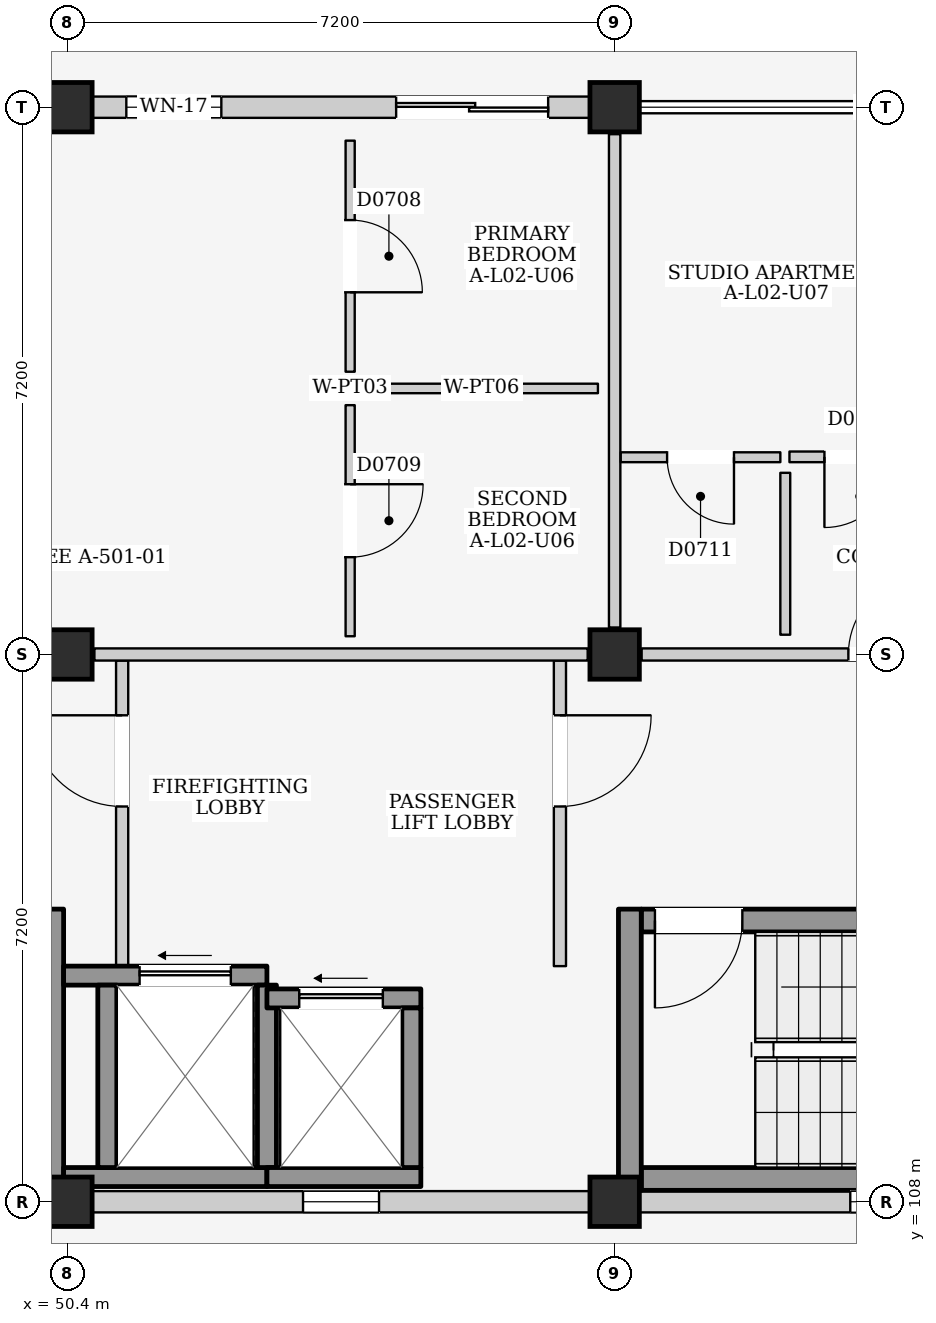
"""IFC4 building model, lengths in metres.
Left out: names, types, materials, properties, quantities, classifications, styles, units other than length and angle.
Written with IfcOpenShell. Run it as: python <this file> out.ifc"""

import sys

from ifc_helpers import new_model, si_unit, direction, frame, frame_2d, origin, origin_2d, place, context, subcontext, project, spatial, rectangle, extrude, element, fill, save


model = new_model("IFC4")
c1 = context("Model", 3, precision=1e-05, world=origin(), true_north=direction((0.0, 1.0)))
c2 = subcontext(c1, "Body", "Model", "MODEL_VIEW")
j1 = project(units=[si_unit("LENGTHUNIT", "METRE"), si_unit("PLANEANGLEUNIT", "RADIAN")], contexts=[c1])
p1 = place(None, origin())
s1 = spatial("IfcSite", under=j1, at=p1, CompositionType="ELEMENT")
p2 = place(p1, origin())
s2 = spatial("IfcBuilding", under=s1, at=p2, CompositionType="ELEMENT")
p3 = place(p2, frame((0.0, 0.0, 9.0)))
s3 = spatial("IfcBuildingStorey", under=s2, at=p3, CompositionType="ELEMENT", Elevation=9.0)
for number, where, z_axis, x_axis in (
    (1, (50.4, 108.0, 0.0), (0.0, 0.0, 1.0), (1.0, 0.0, 0.0)),
    (2, (50.4, 115.2, 0.0), (0.0, 0.0, 1.0), (1.0, 0.0, 0.0)),
    (3, (50.4, 122.4, 0.0), (0.0, 0.0, 1.0), (1.0, 0.0, 0.0)),
    (4, (57.6, 108.0, 0.0), (0.0, 0.0, 1.0), (1.0, 0.0, 0.0)),
    (5, (57.6, 115.2, 0.0), (0.0, 0.0, 1.0), (1.0, 0.0, 0.0)),
    (6, (57.6, 122.4, 0.0), (0.0, 0.0, 1.0), (1.0, 0.0, 0.0)),
):
    element("IfcColumn", number, at=place(p3, frame(where, z_axis=z_axis, x_axis=x_axis)), inside=s3, PredefinedType="COLUMN", context=c2, shape_type="SweptSolid", body=[
        extrude(rectangle(XDim=0.65, YDim=0.65, at=origin_2d()), origin(), (0.0, 0.0, 1.0), 3.2),
    ])
p4 = place(p3, frame((50.725, 122.4, 0.0), z_axis=(0.0, 0.0, 1.0), x_axis=(1.0, 0.0, 0.0)))
e7 = element("IfcWall", 7, at=p4, inside=s3, PredefinedType="ELEMENTEDWALL", context=c2, shape_type="SweptSolid", body=[
    extrude(rectangle(XDim=6.55, YDim=0.28, at=frame_2d((3.275, 0.0))), origin(), (0.0, 0.0, 1.0), 2.425),
])
p5 = place(p4, frame((4.0, 0.0, 0.0)))
e8 = element("IfcOpeningElement", 8, at=p5, cuts=e7, PredefinedType="OPENING", context=c2, shape_type="SweptSolid", body=[
    extrude(rectangle(XDim=2.0, YDim=2.12, at=frame_2d((1.0, 1.06))), frame((0.0, 0.155, 0.0), z_axis=(0.0, -1.0, 0.0), x_axis=(1.0, 0.0, 0.0)), (0.0, 0.0, 1.0), 0.31),
])
p6 = place(p4, frame((0.45, 0.0, 0.9)))
e9 = element("IfcOpeningElement", 9, at=p6, cuts=e7, PredefinedType="OPENING", context=c2, shape_type="SweptSolid", body=[
    extrude(rectangle(XDim=1.25, YDim=1.3, at=frame_2d((0.625, 0.65))), frame((0.0, 0.155, 0.0), z_axis=(0.0, -1.0, 0.0), x_axis=(1.0, 0.0, 0.0)), (0.0, 0.0, 1.0), 0.31),
])
p7 = place(p3, frame((50.725, 108.0, 0.0), z_axis=(0.0, 0.0, 1.0), x_axis=(1.0, 0.0, 0.0)))
e10 = element("IfcWall", 10, at=p7, inside=s3, PredefinedType="ELEMENTEDWALL", context=c2, shape_type="SweptSolid", body=[
    extrude(rectangle(XDim=6.55, YDim=0.28, at=frame_2d((3.275, 0.0))), origin(), (0.0, 0.0, 1.0), 2.295),
])
p8 = place(p7, frame((2.775, 0.0, 1.2)))
e11 = element("IfcOpeningElement", 11, at=p8, cuts=e10, PredefinedType="OPENING", context=c2, shape_type="SweptSolid", body=[
    extrude(rectangle(XDim=1.0, YDim=0.9, at=frame_2d((0.5, 0.45))), frame((0.0, 0.155, 0.0), z_axis=(0.0, -1.0, 0.0), x_axis=(1.0, 0.0, 0.0)), (0.0, 0.0, 1.0), 0.31),
])
p9 = place(p3, frame((57.925, 108.0, 0.0), z_axis=(0.0, 0.0, 1.0), x_axis=(1.0, 0.0, 0.0)))
e12 = element("IfcWall", 12, at=p9, inside=s3, PredefinedType="ELEMENTEDWALL", context=c2, shape_type="SweptSolid", body=[
    extrude(rectangle(XDim=6.55, YDim=0.28, at=frame_2d((3.275, 0.0))), origin(), (0.0, 0.0, 1.0), 2.295),
])
p10 = place(p9, frame((2.775, 0.0, 1.2)))
e13 = element("IfcOpeningElement", 13, at=p10, cuts=e12, PredefinedType="OPENING", context=c2, shape_type="SweptSolid", body=[
    extrude(rectangle(XDim=1.0, YDim=0.9, at=frame_2d((0.5, 0.45))), frame((0.0, 0.155, 0.0), z_axis=(0.0, -1.0, 0.0), x_axis=(1.0, 0.0, 0.0)), (0.0, 0.0, 1.0), 0.31),
])
p11 = place(p3, frame((50.2, 108.15, 0.0), z_axis=(0.0, 0.0, 1.0), x_axis=(0.0, 1.0, 0.0)))
e14 = element("IfcWall", 14, at=p11, inside=s3, PredefinedType="SHEAR", context=c2, shape_type="SweptSolid", body=[
    extrude(rectangle(XDim=3.7, YDim=0.3, at=frame_2d((1.85, 0.0))), origin(), (0.0, 0.0, 1.0), 2.96),
])
p12 = place(p3, frame((51.12, 111.1, 0.0), z_axis=(0.0, 0.0, 1.0), x_axis=(0.0, 1.0, 0.0)))
e15 = element("IfcWall", 15, at=p12, inside=s3, PredefinedType="PARTITIONING", context=c2, shape_type="SweptSolid", body=[
    extrude(rectangle(XDim=4.02, YDim=0.16, at=frame_2d((2.01, 0.0))), origin(), (0.0, 0.0, 1.0), 2.96),
])
p13 = place(p12, frame((2.1, 0.0, 0.0)))
e16 = element("IfcOpeningElement", 16, at=p13, cuts=e15, PredefinedType="OPENING", context=c2, shape_type="SweptSolid", body=[
    extrude(rectangle(XDim=1.2, YDim=2.2, at=frame_2d((0.6, 1.1))), frame((0.0, 0.095, 0.0), z_axis=(0.0, -1.0, 0.0), x_axis=(1.0, 0.0, 0.0)), (0.0, 0.0, 1.0), 0.19),
])
p14 = place(p3, frame((56.88, 111.1, 0.0), z_axis=(0.0, 0.0, 1.0), x_axis=(0.0, 1.0, 0.0)))
e17 = element("IfcWall", 17, at=p14, inside=s3, PredefinedType="PARTITIONING", context=c2, shape_type="SweptSolid", body=[
    extrude(rectangle(XDim=4.02, YDim=0.16, at=frame_2d((2.01, 0.0))), origin(), (0.0, 0.0, 1.0), 2.96),
])
p15 = place(p14, frame((2.1, 0.0, 0.0)))
e18 = element("IfcOpeningElement", 18, at=p15, cuts=e17, PredefinedType="OPENING", context=c2, shape_type="SweptSolid", body=[
    extrude(rectangle(XDim=1.2, YDim=2.2, at=frame_2d((0.6, 1.1))), frame((0.0, 0.095, 0.0), z_axis=(0.0, -1.0, 0.0), x_axis=(1.0, 0.0, 0.0)), (0.0, 0.0, 1.0), 0.19),
])
p16 = place(p3, frame((50.35, 108.325, 0.0), z_axis=(0.0, 0.0, 1.0), x_axis=(1.0, 0.0, 0.0)))
e19 = element("IfcWall", 19, at=p16, inside=s3, PredefinedType="SHEAR", context=c2, shape_type="SweptSolid", body=[
    extrude(rectangle(XDim=2.675, YDim=0.25, at=frame_2d((1.337, 0.0))), origin(), (0.0, 0.0, 1.0), 2.96),
])
p17 = place(p3, frame((50.35, 110.975, 0.0), z_axis=(0.0, 0.0, 1.0), x_axis=(1.0, 0.0, 0.0)))
e20 = element("IfcWall", 20, at=p17, inside=s3, PredefinedType="SHEAR", context=c2, shape_type="SweptSolid", body=[
    extrude(rectangle(XDim=2.675, YDim=0.25, at=frame_2d((1.337, 0.0))), origin(), (0.0, 0.0, 1.0), 2.96),
])
p18 = place(p17, frame((1.0, 0.0, 0.0)))
e21 = element("IfcOpeningElement", 21, at=p18, cuts=e20, PredefinedType="OPENING", context=c2, shape_type="SweptSolid", body=[
    extrude(rectangle(XDim=1.2, YDim=2.25, at=frame_2d((0.6, 1.125))), frame((0.0, 0.14, 0.0), z_axis=(0.0, -1.0, 0.0), x_axis=(1.0, 0.0, 0.0)), (0.0, 0.0, 1.0), 0.28),
])
for number, where, z_axis, x_axis in (
    (22, (50.925, 108.45, 0.0), (0.0, 0.0, 1.0), (0.0, 1.0, 0.0)),
    (23, (53.025, 108.45, 0.0), (0.0, 0.0, 1.0), (0.0, 1.0, 0.0)),
):
    element("IfcWall", number, at=place(p3, frame(where, z_axis=z_axis, x_axis=x_axis)), inside=s3, PredefinedType="SHEAR", context=c2, shape_type="SweptSolid", body=[
        extrude(rectangle(XDim=2.4, YDim=0.25, at=frame_2d((1.2, 0.0))), origin(), (0.0, 0.0, 1.0), 2.96),
    ])
p19 = place(p3, frame((53.025, 108.325, 0.0), z_axis=(0.0, 0.0, 1.0), x_axis=(1.0, 0.0, 0.0)))
e24 = element("IfcWall", 24, at=p19, inside=s3, PredefinedType="SHEAR", context=c2, shape_type="SweptSolid", body=[
    extrude(rectangle(XDim=2.025, YDim=0.25, at=frame_2d((1.013, 0.0))), origin(), (0.0, 0.0, 1.0), 2.96),
])
p20 = place(p3, frame((53.025, 110.675, 0.0), z_axis=(0.0, 0.0, 1.0), x_axis=(1.0, 0.0, 0.0)))
e25 = element("IfcWall", 25, at=p20, inside=s3, PredefinedType="SHEAR", context=c2, shape_type="SweptSolid", body=[
    extrude(rectangle(XDim=2.025, YDim=0.25, at=frame_2d((1.013, 0.0))), origin(), (0.0, 0.0, 1.0), 2.96),
])
p21 = place(p20, frame((0.425, 0.0, 0.0)))
e26 = element("IfcOpeningElement", 26, at=p21, cuts=e25, PredefinedType="OPENING", context=c2, shape_type="SweptSolid", body=[
    extrude(rectangle(XDim=1.1, YDim=2.15, at=frame_2d((0.55, 1.075))), frame((0.0, 0.14, 0.0), z_axis=(0.0, -1.0, 0.0), x_axis=(1.0, 0.0, 0.0)), (0.0, 0.0, 1.0), 0.28),
])
p22 = place(p3, frame((54.925, 108.45, 0.0), z_axis=(0.0, 0.0, 1.0), x_axis=(0.0, 1.0, 0.0)))
e27 = element("IfcWall", 27, at=p22, inside=s3, PredefinedType="SHEAR", context=c2, shape_type="SweptSolid", body=[
    extrude(rectangle(XDim=2.1, YDim=0.25, at=frame_2d((1.05, 0.0))), origin(), (0.0, 0.0, 1.0), 2.96),
])
p23 = place(p3, frame((57.95, 108.3, 0.0), z_axis=(0.0, 0.0, 1.0), x_axis=(1.0, 0.0, 0.0)))
e28 = element("IfcWall", 28, at=p23, inside=s3, PredefinedType="SHEAR", context=c2, shape_type="SweptSolid", body=[
    extrude(rectangle(XDim=6.5, YDim=0.3, at=frame_2d((3.25, 0.0))), origin(), (0.0, 0.0, 1.0), 2.96),
])
p24 = place(p3, frame((57.95, 111.7, 0.0), z_axis=(0.0, 0.0, 1.0), x_axis=(1.0, 0.0, 0.0)))
e29 = element("IfcWall", 29, at=p24, inside=s3, PredefinedType="SHEAR", context=c2, shape_type="SweptSolid", body=[
    extrude(rectangle(XDim=6.5, YDim=0.3, at=frame_2d((3.25, 0.0))), origin(), (0.0, 0.0, 1.0), 2.96),
])
p25 = place(p24, frame((0.18, 0.0, 0.0)))
e30 = element("IfcOpeningElement", 30, at=p25, cuts=e29, PredefinedType="OPENING", context=c2, shape_type="SweptSolid", body=[
    extrude(rectangle(XDim=1.15, YDim=2.2, at=frame_2d((0.575, 1.1))), frame((0.0, 0.165, 0.0), z_axis=(0.0, -1.0, 0.0), x_axis=(1.0, 0.0, 0.0)), (0.0, 0.0, 1.0), 0.33),
])
p26 = place(p3, frame((57.8, 108.15, 0.0), z_axis=(0.0, 0.0, 1.0), x_axis=(0.0, 1.0, 0.0)))
e31 = element("IfcWall", 31, at=p26, inside=s3, PredefinedType="SHEAR", context=c2, shape_type="SweptSolid", body=[
    extrude(rectangle(XDim=3.7, YDim=0.3, at=frame_2d((1.85, 0.0))), origin(), (0.0, 0.0, 1.0), 2.96),
])
p27 = place(p3, frame((50.755, 115.2, 0.0), z_axis=(0.0, 0.0, 1.0), x_axis=(1.0, 0.0, 0.0)))
e32 = element("IfcWall", 32, at=p27, inside=s3, PredefinedType="PARTITIONING", context=c2, shape_type="SweptSolid", body=[
    extrude(rectangle(XDim=6.49, YDim=0.16, at=frame_2d((3.245, 0.0))), origin(), (0.0, 0.0, 1.0), 2.295),
])
p28 = place(p3, frame((57.6, 115.555, 0.0), z_axis=(0.0, 0.0, 1.0), x_axis=(0.0, 1.0, 0.0)))
e33 = element("IfcWall", 33, at=p28, inside=s3, PredefinedType="PARTITIONING", context=c2, shape_type="SweptSolid", body=[
    extrude(rectangle(XDim=6.49, YDim=0.15, at=frame_2d((3.245, 0.0))), origin(), (0.0, 0.0, 1.0), 2.395),
])
p29 = place(p3, frame((54.12, 118.92, 0.0), z_axis=(0.0, 0.0, 1.0), x_axis=(0.0, 1.0, 0.0)))
e34 = element("IfcWall", 34, at=p29, inside=s3, PredefinedType="PARTITIONING", context=c2, shape_type="SweptSolid", body=[
    extrude(rectangle(XDim=3.04, YDim=0.12, at=frame_2d((1.52, 0.0))), origin(), (0.0, 0.0, 1.0), 2.96),
])
p30 = place(p29, frame((1.045, 0.0, 0.0)))
e35 = element("IfcOpeningElement", 35, at=p30, cuts=e34, PredefinedType="OPENING", context=c2, shape_type="SweptSolid", body=[
    extrude(rectangle(XDim=0.95, YDim=2.15, at=frame_2d((0.475, 1.075))), frame((0.0, 0.075, 0.0), z_axis=(0.0, -1.0, 0.0), x_axis=(1.0, 0.0, 0.0)), (0.0, 0.0, 1.0), 0.15),
])
p31 = place(p3, frame((54.32, 118.7, 0.0), z_axis=(0.0, 0.0, 1.0), x_axis=(1.0, 0.0, 0.0)))
e36 = element("IfcWall", 36, at=p31, inside=s3, PredefinedType="PARTITIONING", context=c2, shape_type="SweptSolid", body=[
    extrude(rectangle(XDim=3.06, YDim=0.125, at=frame_2d((1.53, 0.0))), origin(), (0.0, 0.0, 1.0), 2.96),
])
p32 = place(p3, frame((54.12, 115.44, 0.0), z_axis=(0.0, 0.0, 1.0), x_axis=(0.0, 1.0, 0.0)))
e37 = element("IfcWall", 37, at=p32, inside=s3, PredefinedType="PARTITIONING", context=c2, shape_type="SweptSolid", body=[
    extrude(rectangle(XDim=3.04, YDim=0.12, at=frame_2d((1.52, 0.0))), origin(), (0.0, 0.0, 1.0), 2.96),
])
p33 = place(p32, frame((1.04, 0.0, 0.0)))
e38 = element("IfcOpeningElement", 38, at=p33, cuts=e37, PredefinedType="OPENING", context=c2, shape_type="SweptSolid", body=[
    extrude(rectangle(XDim=0.96, YDim=2.15, at=frame_2d((0.48, 1.075))), frame((0.0, 0.075, 0.0), z_axis=(0.0, -1.0, 0.0), x_axis=(1.0, 0.0, 0.0)), (0.0, 0.0, 1.0), 0.15),
])
p34 = place(p3, frame((57.955, 115.2, 0.0), z_axis=(0.0, 0.0, 1.0), x_axis=(1.0, 0.0, 0.0)))
e39 = element("IfcWall", 39, at=p34, inside=s3, PredefinedType="PARTITIONING", context=c2, shape_type="SweptSolid", body=[
    extrude(rectangle(XDim=6.49, YDim=0.16, at=frame_2d((3.245, 0.0))), origin(), (0.0, 0.0, 1.0), 2.295),
])
p35 = place(p34, frame((2.72, 0.0, 0.0)))
e40 = element("IfcOpeningElement", 40, at=p35, cuts=e39, PredefinedType="OPENING", context=c2, shape_type="SweptSolid", body=[
    extrude(rectangle(XDim=1.05, YDim=2.15, at=frame_2d((0.525, 1.075))), frame((0.0, 0.095, 0.0), z_axis=(0.0, -1.0, 0.0), x_axis=(1.0, 0.0, 0.0)), (0.0, 0.0, 1.0), 0.19),
])
p36 = place(p3, frame((57.68, 117.795, 0.0), z_axis=(0.0, 0.0, 1.0), x_axis=(1.0, 0.0, 0.0)))
e41 = element("IfcWall", 41, at=p36, inside=s3, PredefinedType="PARTITIONING", context=c2, shape_type="SweptSolid", body=[
    extrude(rectangle(XDim=2.1, YDim=0.13, at=frame_2d((1.05, 0.0))), origin(), (0.0, 0.0, 1.0), 2.96),
])
p37 = place(p36, frame((0.61, 0.0, 0.0)))
e42 = element("IfcOpeningElement", 42, at=p37, cuts=e41, PredefinedType="OPENING", context=c2, shape_type="SweptSolid", body=[
    extrude(rectangle(XDim=0.88, YDim=2.1, at=frame_2d((0.44, 1.05))), frame((0.0, 0.08, 0.0), z_axis=(0.0, -1.0, 0.0), x_axis=(1.0, 0.0, 0.0)), (0.0, 0.0, 1.0), 0.16),
])
p38 = place(p3, frame((59.845, 115.46, 0.0), z_axis=(0.0, 0.0, 1.0), x_axis=(0.0, 1.0, 0.0)))
e43 = element("IfcWall", 43, at=p38, inside=s3, PredefinedType="PARTITIONING", context=c2, shape_type="SweptSolid", body=[
    extrude(rectangle(XDim=2.13, YDim=0.13, at=frame_2d((1.065, 0.0))), origin(), (0.0, 0.0, 1.0), 2.96),
])
p39 = place(p3, frame((59.9, 117.8, 0.0), z_axis=(0.0, 0.0, 1.0), x_axis=(1.0, 0.0, 0.0)))
e44 = element("IfcWall", 44, at=p39, inside=s3, PredefinedType="PARTITIONING", context=c2, shape_type="SweptSolid", body=[
    extrude(rectangle(XDim=1.85, YDim=0.14, at=frame_2d((0.925, 0.0))), origin(), (0.0, 0.0, 1.0), 2.96),
])
p40 = place(p39, frame((0.46, 0.0, 0.0)))
e45 = element("IfcOpeningElement", 45, at=p40, cuts=e44, PredefinedType="OPENING", context=c2, shape_type="SweptSolid", body=[
    extrude(rectangle(XDim=0.93, YDim=2.14, at=frame_2d((0.465, 1.07))), frame((0.0, 0.085, 0.0), z_axis=(0.0, -1.0, 0.0), x_axis=(1.0, 0.0, 0.0)), (0.0, 0.0, 1.0), 0.17),
])
p41 = place(p5, frame((2.0, 0.0, 0.0), z_axis=(0.0, 0.0, 1.0), x_axis=(-1.0, 0.0, 0.0)))
e46 = element("IfcDoor", 46, at=p41, inside=s3, OperationType="DOUBLE_DOOR_SLIDING", PredefinedType="DOOR", context=c2, shape_type="SweptSolid", body=[
    extrude(rectangle(XDim=2.0, YDim=2.12, at=frame_2d((1.0, 1.06))), frame((0.0, 0.025, 0.0), z_axis=(0.0, -1.0, 0.0), x_axis=(1.0, 0.0, 0.0)), (0.0, 0.0, 1.0), 0.05),
])
fill(e8, e46)
p42 = place(p6, origin())
e47 = element("IfcWindow", 47, at=p42, inside=s3, PartitioningType="SINGLE_PANEL", PredefinedType="WINDOW", context=c2, shape_type="SweptSolid", body=[
    extrude(rectangle(XDim=1.25, YDim=1.3, at=frame_2d((0.625, 0.65))), frame((0.0, 0.03, 0.0), z_axis=(0.0, -1.0, 0.0), x_axis=(1.0, 0.0, 0.0)), (0.0, 0.0, 1.0), 0.06),
])
fill(e9, e47)
p43 = place(p8, origin())
e48 = element("IfcWindow", 48, at=p43, inside=s3, PartitioningType="SINGLE_PANEL", PredefinedType="WINDOW", context=c2, shape_type="SweptSolid", body=[
    extrude(rectangle(XDim=1.0, YDim=0.9, at=frame_2d((0.5, 0.45))), frame((0.0, 0.03, 0.0), z_axis=(0.0, -1.0, 0.0), x_axis=(1.0, 0.0, 0.0)), (0.0, 0.0, 1.0), 0.06),
])
fill(e11, e48)
p44 = place(p10, origin())
e49 = element("IfcWindow", 49, at=p44, inside=s3, PartitioningType="SINGLE_PANEL", PredefinedType="WINDOW", context=c2, shape_type="SweptSolid", body=[
    extrude(rectangle(XDim=1.0, YDim=0.9, at=frame_2d((0.5, 0.45))), frame((0.0, 0.03, 0.0), z_axis=(0.0, -1.0, 0.0), x_axis=(1.0, 0.0, 0.0)), (0.0, 0.0, 1.0), 0.06),
])
fill(e13, e49)
p45 = place(p13, origin())
e50 = element("IfcDoor", 50, at=p45, inside=s3, OperationType="SINGLE_SWING_RIGHT", PredefinedType="DOOR", context=c2, shape_type="SweptSolid", body=[
    extrude(rectangle(XDim=1.2, YDim=2.2, at=frame_2d((0.6, 1.1))), frame((0.0, 0.025, 0.0), z_axis=(0.0, -1.0, 0.0), x_axis=(1.0, 0.0, 0.0)), (0.0, 0.0, 1.0), 0.05),
])
fill(e16, e50)
p46 = place(p15, frame((1.2, 0.0, 0.0), z_axis=(0.0, 0.0, 1.0), x_axis=(-1.0, 0.0, 0.0)))
e51 = element("IfcDoor", 51, at=p46, inside=s3, OperationType="SINGLE_SWING_LEFT", PredefinedType="DOOR", context=c2, shape_type="SweptSolid", body=[
    extrude(rectangle(XDim=1.2, YDim=2.2, at=frame_2d((0.6, 1.1))), frame((0.0, 0.025, 0.0), z_axis=(0.0, -1.0, 0.0), x_axis=(1.0, 0.0, 0.0)), (0.0, 0.0, 1.0), 0.05),
])
fill(e18, e51)
p47 = place(p18, origin())
e52 = element("IfcDoor", 52, at=p47, inside=s3, OperationType="SLIDING_TO_LEFT", PredefinedType="DOOR", context=c2, shape_type="SweptSolid", body=[
    extrude(rectangle(XDim=1.2, YDim=2.25, at=frame_2d((0.6, 1.125))), frame((0.0, 0.025, 0.0), z_axis=(0.0, -1.0, 0.0), x_axis=(1.0, 0.0, 0.0)), (0.0, 0.0, 1.0), 0.05),
])
fill(e21, e52)
p48 = place(p21, origin())
e53 = element("IfcDoor", 53, at=p48, inside=s3, OperationType="SLIDING_TO_LEFT", PredefinedType="DOOR", context=c2, shape_type="SweptSolid", body=[
    extrude(rectangle(XDim=1.1, YDim=2.15, at=frame_2d((0.55, 1.075))), frame((0.0, 0.025, 0.0), z_axis=(0.0, -1.0, 0.0), x_axis=(1.0, 0.0, 0.0)), (0.0, 0.0, 1.0), 0.05),
])
fill(e26, e53)
p49 = place(p25, frame((1.15, 0.0, 0.0), z_axis=(0.0, 0.0, 1.0), x_axis=(-1.0, 0.0, 0.0)))
e54 = element("IfcDoor", 54, at=p49, inside=s3, OperationType="SINGLE_SWING_RIGHT", PredefinedType="DOOR", context=c2, shape_type="SweptSolid", body=[
    extrude(rectangle(XDim=1.15, YDim=2.2, at=frame_2d((0.575, 1.1))), frame((0.0, 0.025, 0.0), z_axis=(0.0, -1.0, 0.0), x_axis=(1.0, 0.0, 0.0)), (0.0, 0.0, 1.0), 0.05),
])
fill(e30, e54)
p50 = place(p30, frame((0.95, 0.0, 0.0), z_axis=(0.0, 0.0, 1.0), x_axis=(-1.0, 0.0, 0.0)))
e55 = element("IfcDoor", 55, at=p50, inside=s3, OperationType="SINGLE_SWING_RIGHT", PredefinedType="DOOR", context=c2, shape_type="SweptSolid", body=[
    extrude(rectangle(XDim=0.95, YDim=2.15, at=frame_2d((0.475, 1.075))), frame((0.0, 0.025, 0.0), z_axis=(0.0, -1.0, 0.0), x_axis=(1.0, 0.0, 0.0)), (0.0, 0.0, 1.0), 0.05),
])
fill(e35, e55)
p51 = place(p33, frame((0.96, 0.0, 0.0), z_axis=(0.0, 0.0, 1.0), x_axis=(-1.0, 0.0, 0.0)))
e56 = element("IfcDoor", 56, at=p51, inside=s3, OperationType="SINGLE_SWING_LEFT", PredefinedType="DOOR", context=c2, shape_type="SweptSolid", body=[
    extrude(rectangle(XDim=0.96, YDim=2.15, at=frame_2d((0.48, 1.075))), frame((0.0, 0.025, 0.0), z_axis=(0.0, -1.0, 0.0), x_axis=(1.0, 0.0, 0.0)), (0.0, 0.0, 1.0), 0.05),
])
fill(e38, e56)
p52 = place(p35, origin())
e57 = element("IfcDoor", 57, at=p52, inside=s3, OperationType="SINGLE_SWING_RIGHT", PredefinedType="DOOR", context=c2, shape_type="SweptSolid", body=[
    extrude(rectangle(XDim=1.05, YDim=2.15, at=frame_2d((0.525, 1.075))), frame((0.0, 0.025, 0.0), z_axis=(0.0, -1.0, 0.0), x_axis=(1.0, 0.0, 0.0)), (0.0, 0.0, 1.0), 0.05),
])
fill(e40, e57)
p53 = place(p37, frame((0.88, 0.0, 0.0), z_axis=(0.0, 0.0, 1.0), x_axis=(-1.0, 0.0, 0.0)))
e58 = element("IfcDoor", 58, at=p53, inside=s3, OperationType="SINGLE_SWING_LEFT", PredefinedType="DOOR", context=c2, shape_type="SweptSolid", body=[
    extrude(rectangle(XDim=0.88, YDim=2.1, at=frame_2d((0.44, 1.05))), frame((0.0, 0.025, 0.0), z_axis=(0.0, -1.0, 0.0), x_axis=(1.0, 0.0, 0.0)), (0.0, 0.0, 1.0), 0.05),
])
fill(e42, e58)
p54 = place(p40, frame((0.93, 0.0, 0.0), z_axis=(0.0, 0.0, 1.0), x_axis=(-1.0, 0.0, 0.0)))
e59 = element("IfcDoor", 59, at=p54, inside=s3, OperationType="SINGLE_SWING_RIGHT", PredefinedType="DOOR", context=c2, shape_type="SweptSolid", body=[
    extrude(rectangle(XDim=0.93, YDim=2.14, at=frame_2d((0.465, 1.07))), frame((0.0, 0.025, 0.0), z_axis=(0.0, -1.0, 0.0), x_axis=(1.0, 0.0, 0.0)), (0.0, 0.0, 1.0), 0.05),
])
fill(e45, e59)
save(model, sys.argv[1])
